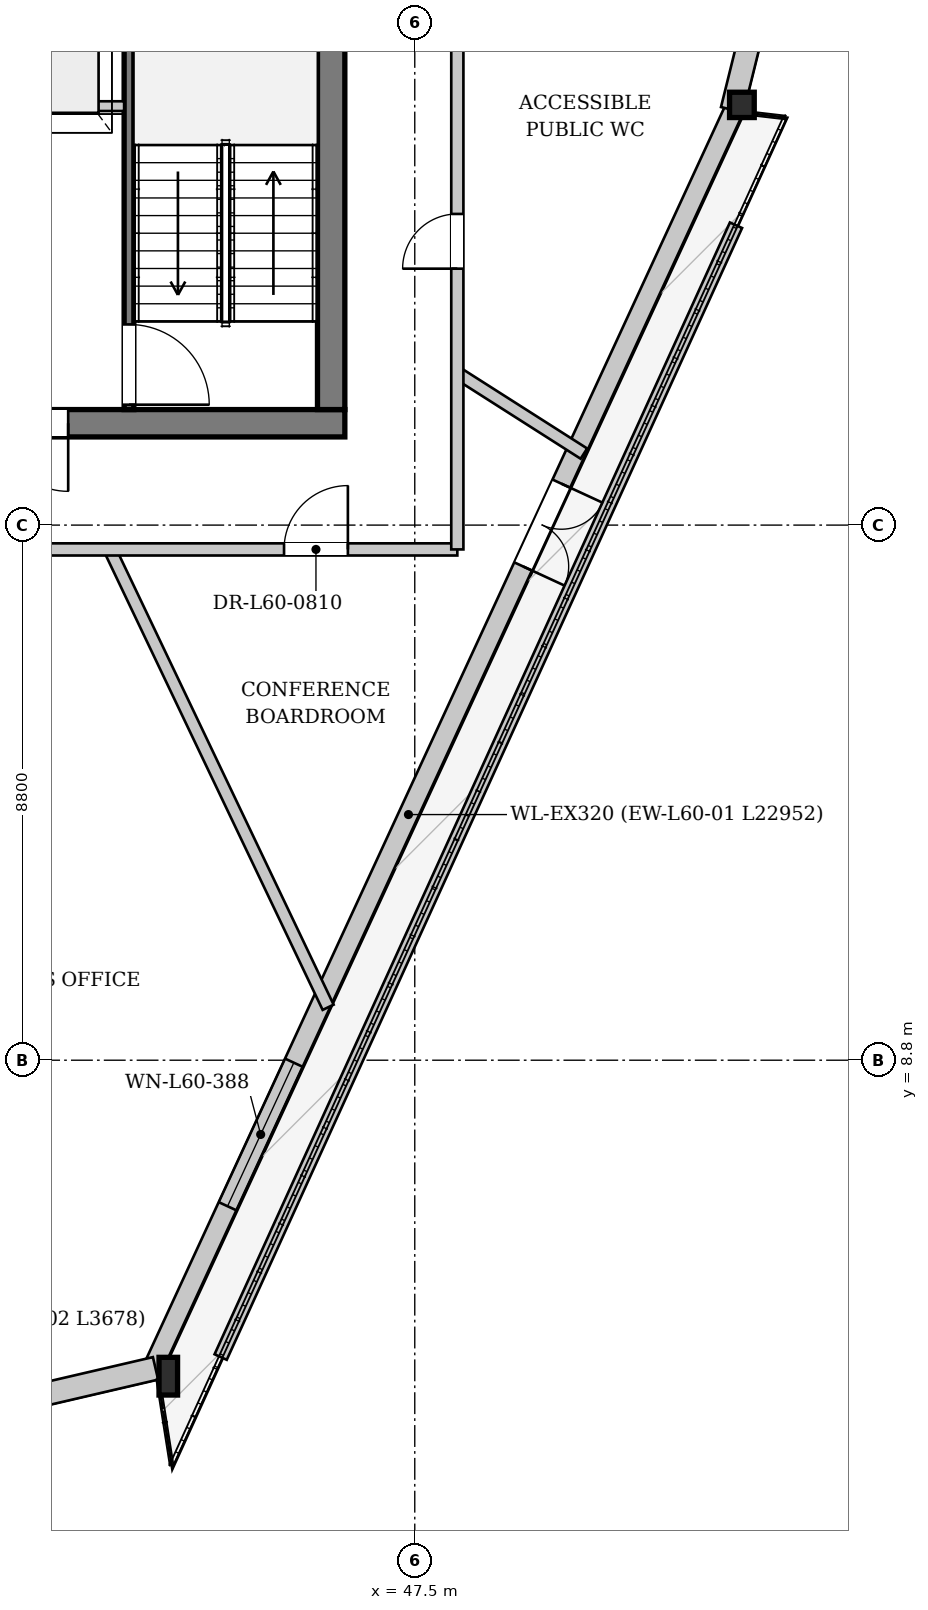
"""IFC4 building model, lengths in metres.
Left out: names, types, materials, properties, quantities, classifications, styles, units other than length and angle.
Written with IfcOpenShell. Run it as: python <this file> out.ifc"""

import sys

from ifc_helpers import new_model, si_unit, direction, frame, frame_2d, origin, origin_2d, place, context, subcontext, project, spatial, rectangle, i_section, extrude, source, transform, mapped, element, fill, save


model = new_model("IFC4")
c1 = context("Model", 3, precision=1e-05, world=origin(), true_north=direction((0.0, 1.0)))
c2 = subcontext(c1, "Body", "Model", "MODEL_VIEW")
j1 = project(units=[si_unit("LENGTHUNIT", "METRE"), si_unit("PLANEANGLEUNIT", "RADIAN")], contexts=[c1])
p1 = place(None, origin())
s1 = spatial("IfcSite", under=j1, at=p1, CompositionType="ELEMENT")
p2 = place(p1, origin())
s2 = spatial("IfcBuilding", under=s1, at=p2, CompositionType="ELEMENT")
p3 = place(p2, frame((0.0, 0.0, 227.35)))
s3 = spatial("IfcBuildingStorey", under=s2, at=p3, CompositionType="ELEMENT", Elevation=227.35)
m1 = source(origin(), c2, "Body", "SweptSolid", [
    extrude(i_section(OverallWidth=0.305, OverallDepth=0.62, WebThickness=0.021, FlangeThickness=0.04, at=origin_2d()), origin(), (0.0, 0.0, 1.0), 3.403),
])
p4 = place(p3, frame((43.28, 3.547, 0.0), z_axis=(0.098063478416, 0.033285628372, 0.994623356424), x_axis=(-0.321418363983, 0.946937292166, 0.0)))
e1 = element("IfcColumn", 1, at=p4, inside=s3, PredefinedType="COLUMN", context=c2, shape_type="MappedRepresentation", body=[
    mapped(m1, transform((0.0, 0.0, 0.0), x_axis=(1.0, 0.0, 0.0), y_axis=(0.0, 1.0, 0.0), z_axis=(0.0, 0.0, 1.0), scale=1.0)),
])
m2 = source(origin(), c2, "Body", "SweptSolid", [
    extrude(i_section(OverallWidth=0.406, OverallDepth=0.416, WebThickness=0.027, FlangeThickness=0.042, at=origin_2d()), origin(), (0.0, 0.0, 1.0), 3.395),
])
p5 = place(p3, frame((52.905, 24.384, 0.0), z_axis=(-0.014886205973, 0.074790600059, 0.997088144055), x_axis=(-0.980761610282, -0.195209282047, 0.0)))
e2 = element("IfcColumn", 2, at=p5, inside=s3, PredefinedType="COLUMN", context=c2, shape_type="MappedRepresentation", body=[
    mapped(m2, transform((0.0, 0.0, 0.0), x_axis=(1.0, 0.0, 0.0), y_axis=(0.0, 1.0, 0.0), z_axis=(0.0, 0.0, 1.0), scale=1.0)),
])
p6 = place(p3, frame((52.76, 24.451, 0.0), z_axis=(0.0, 0.0, 1.0), x_axis=(-0.419378553641, -0.907811449997, 0.0)))
e3 = element("IfcWall", 3, at=p6, inside=s3, PredefinedType="SOLIDWALL", context=c2, shape_type="SweptSolid", body=[
    extrude(rectangle(XDim=22.952, YDim=0.32, at=frame_2d((11.476, 0.0))), origin(), (0.0, 0.0, 1.0), 2.822),
])
p7 = place(p6, frame((6.795, 0.0, 0.0)))
e4 = element("IfcOpeningElement", 4, at=p7, cuts=e3, PredefinedType="OPENING", context=c2, shape_type="SweptSolid", body=[
    extrude(rectangle(XDim=1.5, YDim=2.3, at=frame_2d((0.75, 1.15))), frame((0.0, 0.17, 0.0), z_axis=(0.0, -1.0, 0.0), x_axis=(1.0, 0.0, 0.0)), (0.0, 0.0, 1.0), 0.34),
])
p8 = place(p6, frame((17.285, 0.0, 0.352)))
e5 = element("IfcOpeningElement", 5, at=p8, cuts=e3, PredefinedType="OPENING", context=c2, shape_type="SweptSolid", body=[
    extrude(rectangle(XDim=2.6, YDim=2.35, at=frame_2d((1.3, 1.175))), frame((0.0, 0.17, 0.0), z_axis=(0.0, -1.0, 0.0), x_axis=(1.0, 0.0, 0.0)), (0.0, 0.0, 1.0), 0.34),
])
p9 = place(p3, frame((43.236, 3.732, 0.0), z_axis=(0.0, 0.0, 1.0), x_axis=(-0.973962023235, -0.22671122005, 0.0)))
e6 = element("IfcWall", 6, at=p9, inside=s3, PredefinedType="SOLIDWALL", context=c2, shape_type="SweptSolid", body=[
    extrude(rectangle(XDim=3.677, YDim=0.38, at=frame_2d((1.839, 0.0))), origin(), (0.0, 0.0, 1.0), 2.822),
])
p10 = place(p3, frame((58.237, 46.709, 0.0), z_axis=(0.0, 0.0, 1.0), x_axis=(-0.240317528697, -0.9706943316, 0.0)))
e7 = element("IfcWall", 7, at=p10, inside=s3, PredefinedType="SOLIDWALL", context=c2, shape_type="SweptSolid", body=[
    extrude(rectangle(XDim=22.952, YDim=0.38, at=frame_2d((11.476, 0.0))), origin(), (0.0, 0.0, 1.0), 2.822),
])
p11 = place(p10, frame((5.827, 0.0, 0.65)))
e8 = element("IfcOpeningElement", 8, at=p11, cuts=e7, PredefinedType="OPENING", context=c2, shape_type="SweptSolid", body=[
    extrude(rectangle(XDim=1.2, YDim=1.5, at=frame_2d((0.6, 0.75))), frame((0.0, 0.2, 0.0), z_axis=(0.0, -1.0, 0.0), x_axis=(1.0, 0.0, 0.0)), (0.0, 0.0, 1.0), 0.4),
])
p12 = place(p10, frame((15.926, 0.0, 0.65)))
e9 = element("IfcOpeningElement", 9, at=p12, cuts=e7, PredefinedType="OPENING", context=c2, shape_type="SweptSolid", body=[
    extrude(rectangle(XDim=1.2, YDim=1.5, at=frame_2d((0.6, 0.75))), frame((0.0, 0.2, 0.0), z_axis=(0.0, -1.0, 0.0), x_axis=(1.0, 0.0, 0.0)), (0.0, 0.0, 1.0), 0.4),
])
p13 = place(p3, frame((44.308, 3.919, 0.0), z_axis=(0.0, 0.0, 1.0), x_axis=(0.41441444949, 0.910088272671, 0.0)))
e10 = element("IfcWall", 10, at=p13, inside=s3, PredefinedType="PARAPET", context=c2, shape_type="SweptSolid", body=[
    extrude(rectangle(XDim=20.451, YDim=0.22, at=frame_2d((10.226, 0.0))), origin(), (0.0, 0.0, 1.0), 0.3),
])
p14 = place(p3, frame((46.35, 19.275, 0.0), z_axis=(0.0, 0.0, 1.0), x_axis=(-1.0, 0.0, 0.0)))
e11 = element("IfcWall", 11, at=p14, inside=s3, PredefinedType="SHEAR", context=c2, shape_type="SweptSolid", body=[
    extrude(rectangle(XDim=16.7, YDim=0.45, at=frame_2d((8.35, 0.0))), origin(), (0.0, 0.0, 1.0), 3.33),
])
p15 = place(p14, frame((4.55, 0.0, 0.0)))
e12 = element("IfcOpeningElement", 12, at=p15, cuts=e11, PredefinedType="OPENING", context=c2, shape_type="SweptSolid", body=[
    extrude(rectangle(XDim=1.12, YDim=2.25, at=frame_2d((0.56, 1.125))), frame((0.0, 0.235, 0.0), z_axis=(0.0, -1.0, 0.0), x_axis=(1.0, 0.0, 0.0)), (0.0, 0.0, 1.0), 0.47),
])
p16 = place(p14, frame((11.05, 0.0, 0.0)))
e13 = element("IfcOpeningElement", 13, at=p16, cuts=e11, PredefinedType="OPENING", context=c2, shape_type="SweptSolid", body=[
    extrude(rectangle(XDim=1.12, YDim=2.25, at=frame_2d((0.56, 1.125))), frame((0.0, 0.235, 0.0), z_axis=(0.0, -1.0, 0.0), x_axis=(1.0, 0.0, 0.0)), (0.0, 0.0, 1.0), 0.47),
])
p17 = place(p3, frame((46.125, 33.7, 0.0), z_axis=(0.0, 0.0, 1.0), x_axis=(0.0, -1.0, 0.0)))
e14 = element("IfcWall", 14, at=p17, inside=s3, PredefinedType="SHEAR", context=c2, shape_type="SweptSolid", body=[
    extrude(rectangle(XDim=14.2, YDim=0.45, at=frame_2d((7.1, 0.0))), origin(), (0.0, 0.0, 1.0), 3.33),
])
p18 = place(p17, frame((5.18, 0.0, 0.0)))
e15 = element("IfcOpeningElement", 15, at=p18, cuts=e14, PredefinedType="OPENING", context=c2, shape_type="SweptSolid", body=[
    extrude(rectangle(XDim=1.6, YDim=2.2, at=frame_2d((0.8, 1.1))), frame((0.0, 0.235, 0.0), z_axis=(0.0, -1.0, 0.0), x_axis=(1.0, 0.0, 0.0)), (0.0, 0.0, 1.0), 0.47),
])
p19 = place(p17, frame((2.05, 0.0, 0.0)))
e16 = element("IfcOpeningElement", 16, at=p19, cuts=e14, PredefinedType="OPENING", context=c2, shape_type="SweptSolid", body=[
    extrude(rectangle(XDim=0.95, YDim=2.1, at=frame_2d((0.475, 1.05))), frame((0.0, 0.235, 0.0), z_axis=(0.0, -1.0, 0.0), x_axis=(1.0, 0.0, 0.0)), (0.0, 0.0, 1.0), 0.47),
])
p20 = place(p3, frame((42.8, 26.96, 0.0), z_axis=(0.0, 0.0, 1.0), x_axis=(0.0, -1.0, 0.0)))
e17 = element("IfcWall", 17, at=p20, inside=s3, PredefinedType="PARTITIONING", context=c2, shape_type="SweptSolid", body=[
    extrude(rectangle(XDim=7.46, YDim=0.16, at=frame_2d((3.73, 0.0))), origin(), (0.0, 0.0, 1.0), 3.33),
])
p21 = place(p20, frame((6.06, 0.0, 0.0)))
e18 = element("IfcOpeningElement", 18, at=p21, cuts=e17, PredefinedType="OPENING", context=c2, shape_type="SweptSolid", body=[
    extrude(rectangle(XDim=1.32, YDim=2.2, at=frame_2d((0.66, 1.1))), frame((0.0, 0.09, 0.0), z_axis=(0.0, -1.0, 0.0), x_axis=(1.0, 0.0, 0.0)), (0.0, 0.0, 1.0), 0.18),
])
p22 = place(p3, frame((33.28, 24.49, 0.0), z_axis=(0.0, 0.0, 1.0), x_axis=(1.0, 0.0, 0.0)))
e19 = element("IfcWall", 19, at=p22, inside=s3, PredefinedType="PARTITIONING", context=c2, shape_type="SweptSolid", body=[
    extrude(rectangle(XDim=9.44, YDim=0.16, at=frame_2d((4.72, 0.0))), origin(), (0.0, 0.0, 1.0), 3.33),
])
p23 = place(p3, frame((42.484, 17.2, 0.0), z_axis=(0.0, 0.0, 1.0), x_axis=(0.430513972501, -0.902583912709, 0.0)))
e20 = element("IfcWall", 20, at=p23, inside=s3, PredefinedType="PARTITIONING", context=c2, shape_type="SweptSolid", body=[
    extrude(rectangle(XDim=8.343, YDim=0.2, at=frame_2d((4.171, 0.0))), origin(), (0.0, 0.0, 1.0), 3.33),
])
p24 = place(p3, frame((48.2, 20.102, 0.0), z_axis=(0.0, 0.0, 1.0), x_axis=(0.843376251706, -0.537323457573, 0.0)))
e21 = element("IfcWall", 21, at=p24, inside=s3, PredefinedType="PARTITIONING", context=c2, shape_type="SweptSolid", body=[
    extrude(rectangle(XDim=2.468, YDim=0.2, at=frame_2d((1.234, 0.0))), origin(), (0.0, 0.0, 1.0), 3.33),
])
p25 = place(p3, frame((27.8, 17.2, 0.0), z_axis=(0.0, 0.0, 1.0), x_axis=(1.0, 0.0, 0.0)))
e22 = element("IfcWall", 22, at=p25, inside=s3, PredefinedType="PARTITIONING", context=c2, shape_type="SweptSolid", body=[
    extrude(rectangle(XDim=20.4, YDim=0.2, at=frame_2d((10.2, 0.0))), origin(), (0.0, 0.0, 1.0), 3.33),
])
p26 = place(p25, frame((5.042, 0.0, 0.0)))
e23 = element("IfcOpeningElement", 23, at=p26, cuts=e22, PredefinedType="OPENING", context=c2, shape_type="SweptSolid", body=[
    extrude(rectangle(XDim=1.05, YDim=2.2, at=frame_2d((0.525, 1.1))), frame((0.0, 0.11, 0.0), z_axis=(0.0, -1.0, 0.0), x_axis=(1.0, 0.0, 0.0)), (0.0, 0.0, 1.0), 0.22),
])
p27 = place(p25, frame((11.925, 0.0, 0.0)))
e24 = element("IfcOpeningElement", 24, at=p27, cuts=e22, PredefinedType="OPENING", context=c2, shape_type="SweptSolid", body=[
    extrude(rectangle(XDim=1.05, YDim=2.2, at=frame_2d((0.525, 1.1))), frame((0.0, 0.11, 0.0), z_axis=(0.0, -1.0, 0.0), x_axis=(1.0, 0.0, 0.0)), (0.0, 0.0, 1.0), 0.22),
])
p28 = place(p25, frame((17.55, 0.0, 0.0)))
e25 = element("IfcOpeningElement", 25, at=p28, cuts=e22, PredefinedType="OPENING", context=c2, shape_type="SweptSolid", body=[
    extrude(rectangle(XDim=1.05, YDim=2.2, at=frame_2d((0.525, 1.1))), frame((0.0, 0.11, 0.0), z_axis=(0.0, -1.0, 0.0), x_axis=(1.0, 0.0, 0.0)), (0.0, 0.0, 1.0), 0.22),
])
p29 = place(p3, frame((48.2, 17.2, 0.0), z_axis=(0.0, 0.0, 1.0), x_axis=(0.0, 1.0, 0.0)))
e26 = element("IfcWall", 26, at=p29, inside=s3, PredefinedType="PARTITIONING", context=c2, shape_type="SweptSolid", body=[
    extrude(rectangle(XDim=18.8, YDim=0.2, at=frame_2d((9.4, 0.0))), origin(), (0.0, 0.0, 1.0), 3.075),
])
p30 = place(p29, frame((11.896, 0.0, 0.0)))
e27 = element("IfcOpeningElement", 27, at=p30, cuts=e26, PredefinedType="OPENING", context=c2, shape_type="SweptSolid", body=[
    extrude(rectangle(XDim=1.05, YDim=2.2, at=frame_2d((0.525, 1.1))), frame((0.0, 0.11, 0.0), z_axis=(0.0, -1.0, 0.0), x_axis=(1.0, 0.0, 0.0)), (0.0, 0.0, 1.0), 0.22),
])
p31 = place(p29, frame((4.617, 0.0, 0.0)))
e28 = element("IfcOpeningElement", 28, at=p31, cuts=e26, PredefinedType="OPENING", context=c2, shape_type="SweptSolid", body=[
    extrude(rectangle(XDim=0.9, YDim=2.1, at=frame_2d((0.45, 1.05))), frame((0.0, 0.11, 0.0), z_axis=(0.0, -1.0, 0.0), x_axis=(1.0, 0.0, 0.0)), (0.0, 0.0, 1.0), 0.22),
])
m3 = source(origin(), c2, "Body", "SweptSolid", [
    extrude(rectangle(XDim=1.5, YDim=2.3, at=frame_2d((0.75, 1.15))), frame((0.0, 0.025, 0.0), z_axis=(0.0, -1.0, 0.0), x_axis=(1.0, 0.0, 0.0)), (0.0, 0.0, 1.0), 0.05),
])
p32 = place(p7, origin())
e29 = element("IfcDoor", 29, at=p32, inside=s3, OperationType="DOUBLE_DOOR_SINGLE_SWING", PredefinedType="DOOR", context=c2, shape_type="MappedRepresentation", body=[
    mapped(m3, transform((0.0, 0.0, 0.0), x_axis=(1.0, 0.0, 0.0), y_axis=(0.0, 1.0, 0.0), z_axis=(0.0, 0.0, 1.0), scale=1.0)),
])
fill(e4, e29)
m4 = source(origin(), c2, "Body", "SweptSolid", [
    extrude(rectangle(XDim=2.6, YDim=2.35, at=frame_2d((1.3, 1.175))), frame((0.0, 0.03, 0.0), z_axis=(0.0, -1.0, 0.0), x_axis=(1.0, 0.0, 0.0)), (0.0, 0.0, 1.0), 0.06),
])
p33 = place(p8, origin())
e30 = element("IfcWindow", 30, at=p33, inside=s3, PartitioningType="SINGLE_PANEL", PredefinedType="WINDOW", context=c2, shape_type="MappedRepresentation", body=[
    mapped(m4, transform((0.0, 0.0, 0.0), x_axis=(1.0, 0.0, 0.0), y_axis=(0.0, 1.0, 0.0), z_axis=(0.0, 0.0, 1.0), scale=1.0)),
])
fill(e5, e30)
m5 = source(origin(), c2, "Body", "SweptSolid", [
    extrude(rectangle(XDim=1.12, YDim=2.25, at=frame_2d((0.56, 1.125))), frame((0.0, 0.025, 0.0), z_axis=(0.0, -1.0, 0.0), x_axis=(1.0, 0.0, 0.0)), (0.0, 0.0, 1.0), 0.05),
])
p34 = place(p15, origin())
e31 = element("IfcDoor", 31, at=p34, inside=s3, OperationType="SINGLE_SWING_LEFT", PredefinedType="DOOR", context=c2, shape_type="MappedRepresentation", body=[
    mapped(m5, transform((0.0, 0.0, 0.0), x_axis=(1.0, 0.0, 0.0), y_axis=(0.0, 1.0, 0.0), z_axis=(0.0, 0.0, 1.0), scale=1.0)),
])
fill(e12, e31)
m6 = source(origin(), c2, "Body", "SweptSolid", [
    extrude(rectangle(XDim=1.32, YDim=2.2, at=frame_2d((0.66, 1.1))), frame((0.0, 0.025, 0.0), z_axis=(0.0, -1.0, 0.0), x_axis=(1.0, 0.0, 0.0)), (0.0, 0.0, 1.0), 0.05),
])
p35 = place(p21, origin())
e32 = element("IfcDoor", 32, at=p35, inside=s3, OperationType="SINGLE_SWING_RIGHT", PredefinedType="DOOR", context=c2, shape_type="MappedRepresentation", body=[
    mapped(m6, transform((0.0, 0.0, 0.0), x_axis=(1.0, 0.0, 0.0), y_axis=(0.0, 1.0, 0.0), z_axis=(0.0, 0.0, 1.0), scale=1.0)),
])
fill(e18, e32)
m7 = source(origin(), c2, "Body", "SweptSolid", [
    extrude(rectangle(XDim=1.05, YDim=2.2, at=frame_2d((0.525, 1.1))), frame((0.0, 0.025, 0.0), z_axis=(0.0, -1.0, 0.0), x_axis=(1.0, 0.0, 0.0)), (0.0, 0.0, 1.0), 0.05),
])
p36 = place(p28, origin())
e33 = element("IfcDoor", 33, at=p36, inside=s3, OperationType="SINGLE_SWING_RIGHT", PredefinedType="DOOR", context=c2, shape_type="MappedRepresentation", body=[
    mapped(m7, transform((0.0, 0.0, 0.0), x_axis=(1.0, 0.0, 0.0), y_axis=(0.0, 1.0, 0.0), z_axis=(0.0, 0.0, 1.0), scale=1.0)),
])
fill(e25, e33)
m8 = source(origin(), c2, "Body", "SweptSolid", [
    extrude(rectangle(XDim=0.9, YDim=2.1, at=frame_2d((0.45, 1.05))), frame((0.0, 0.025, 0.0), z_axis=(0.0, -1.0, 0.0), x_axis=(1.0, 0.0, 0.0)), (0.0, 0.0, 1.0), 0.05),
])
p37 = place(p31, origin())
e34 = element("IfcDoor", 34, at=p37, inside=s3, OperationType="SINGLE_SWING_LEFT", PredefinedType="DOOR", context=c2, shape_type="MappedRepresentation", body=[
    mapped(m8, transform((0.0, 0.0, 0.0), x_axis=(1.0, 0.0, 0.0), y_axis=(0.0, 1.0, 0.0), z_axis=(0.0, 0.0, 1.0), scale=1.0)),
])
fill(e28, e34)
save(model, sys.argv[1])
